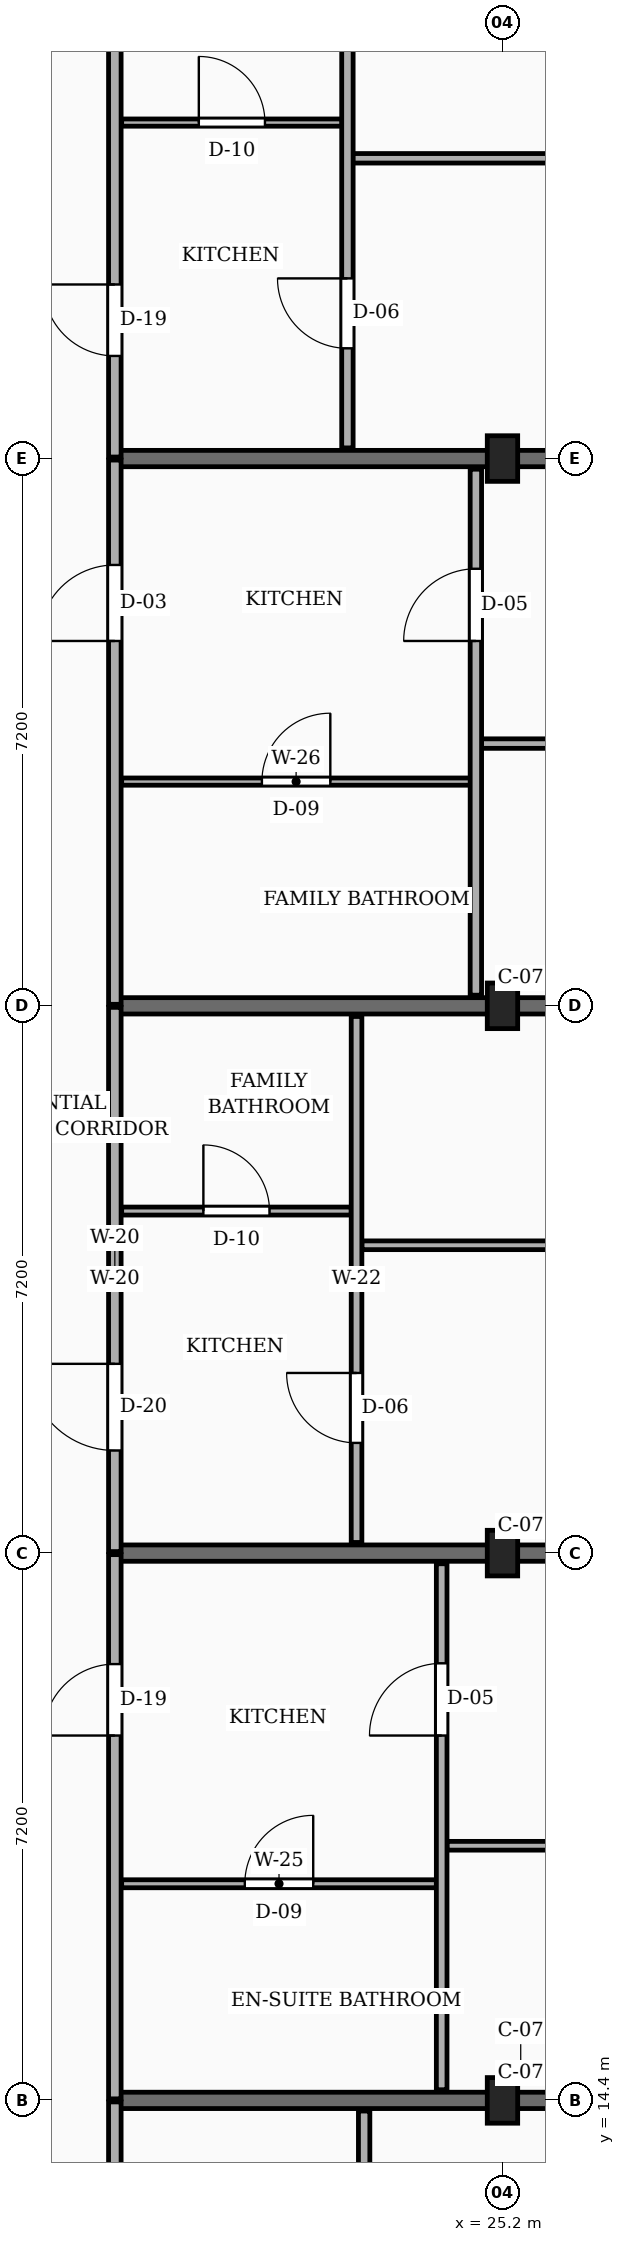
"""IFC4 building model, lengths in metres.
Left out: names, types, materials, properties, quantities, classifications, styles, units other than length and angle.
Written with IfcOpenShell. Run it as: python <this file> out.ifc"""

import sys

from ifc_helpers import new_model, si_unit, direction, frame, frame_2d, origin, origin_2d, place, context, subcontext, project, spatial, rectangle, extrude, element, fill, save


model = new_model("IFC4")
c1 = context("Model", 3, precision=1e-05, world=origin(), true_north=direction((0.0, 1.0)))
c2 = subcontext(c1, "Body", "Model", "MODEL_VIEW")
j1 = project(units=[si_unit("LENGTHUNIT", "METRE"), si_unit("PLANEANGLEUNIT", "RADIAN")], contexts=[c1])
p1 = place(None, origin())
s1 = spatial("IfcSite", under=j1, at=p1, CompositionType="ELEMENT")
p2 = place(p1, origin())
s2 = spatial("IfcBuilding", under=s1, at=p2, CompositionType="ELEMENT")
p3 = place(p2, frame((0.0, 0.0, 29.7)))
s3 = spatial("IfcBuildingStorey", under=s2, at=p3, CompositionType="ELEMENT", Elevation=29.7)
for number, where, z_axis, x_axis in (
    (1, (25.2, 14.4, 0.0), (0.0, 0.0, 1.0), (1.0, 0.0, 0.0)),
    (2, (25.2, 21.6, 0.0), (0.0, 0.0, 1.0), (1.0, 0.0, 0.0)),
    (3, (25.2, 28.8, 0.0), (0.0, 0.0, 1.0), (1.0, 0.0, 0.0)),
    (4, (25.2, 36.0, 0.0), (0.0, 0.0, 1.0), (1.0, 0.0, 0.0)),
):
    element("IfcColumn", number, at=place(p3, frame(where, z_axis=z_axis, x_axis=x_axis)), inside=s3, PredefinedType="COLUMN", context=c2, shape_type="SweptSolid", body=[
        extrude(rectangle(XDim=0.4, YDim=0.6, at=origin_2d()), origin(), (0.0, 0.0, 1.0), 3.15),
    ])
for number, where, z_axis, x_axis in (
    (5, (20.1, 14.4, 0.0), (0.0, 0.0, 1.0), (1.0, 0.0, 0.0)),
    (6, (20.1, 21.6, 0.0), (0.0, 0.0, 1.0), (1.0, 0.0, 0.0)),
    (7, (20.1, 28.8, 0.0), (0.0, 0.0, 1.0), (1.0, 0.0, 0.0)),
    (8, (20.1, 36.0, 0.0), (0.0, 0.0, 1.0), (1.0, 0.0, 0.0)),
):
    element("IfcWall", number, at=place(p3, frame(where, z_axis=z_axis, x_axis=x_axis)), inside=s3, PredefinedType="SOLIDWALL", context=c2, shape_type="SweptSolid", body=[
        extrude(rectangle(XDim=12.05, YDim=0.215, at=frame_2d((6.025, 0.0))), origin(), (0.0, 0.0, 1.0), 2.17),
    ])
p4 = place(p3, frame((20.1, 7.375, 0.0), z_axis=(0.0, 0.0, 1.0), x_axis=(0.0, 1.0, 0.0)))
e9 = element("IfcWall", 9, at=p4, inside=s3, PredefinedType="PARTITIONING", context=c2, shape_type="SweptSolid", body=[
    extrude(rectangle(XDim=7.005, YDim=0.165, at=frame_2d((3.502, 0.0))), origin(), (0.0, 0.0, 1.0), 2.305),
])
p5 = place(p4, frame((1.175, 0.0, 0.0)))
e10 = element("IfcOpeningElement", 10, at=p5, cuts=e9, PredefinedType="OPENING", context=c2, shape_type="SweptSolid", body=[
    extrude(rectangle(XDim=1.0, YDim=2.15, at=frame_2d((0.5, 1.075))), frame((0.0, 0.093, 0.0), z_axis=(0.0, -1.0, 0.0), x_axis=(1.0, 0.0, 0.0)), (0.0, 0.0, 1.0), 0.185),
])
p6 = place(p3, frame((20.1, 14.42, 0.0), z_axis=(0.0, 0.0, 1.0), x_axis=(0.0, 1.0, 0.0)))
e11 = element("IfcWall", 11, at=p6, inside=s3, PredefinedType="PARTITIONING", context=c2, shape_type="SweptSolid", body=[
    extrude(rectangle(XDim=7.16, YDim=0.165, at=frame_2d((3.58, 0.0))), origin(), (0.0, 0.0, 1.0), 2.305),
])
p7 = place(p6, frame((4.78, 0.0, 0.0)))
e12 = element("IfcOpeningElement", 12, at=p7, cuts=e11, PredefinedType="OPENING", context=c2, shape_type="SweptSolid", body=[
    extrude(rectangle(XDim=0.94, YDim=2.12, at=frame_2d((0.47, 1.06))), frame((0.0, 0.093, 0.0), z_axis=(0.0, -1.0, 0.0), x_axis=(1.0, 0.0, 0.0)), (0.0, 0.0, 1.0), 0.185),
])
p8 = place(p3, frame((20.1, 21.62, 0.0), z_axis=(0.0, 0.0, 1.0), x_axis=(0.0, 1.0, 0.0)))
e13 = element("IfcWall", 13, at=p8, inside=s3, PredefinedType="PARTITIONING", context=c2, shape_type="SweptSolid", body=[
    extrude(rectangle(XDim=7.16, YDim=0.165, at=frame_2d((3.58, 0.0))), origin(), (0.0, 0.0, 1.0), 2.305),
])
p9 = place(p8, frame((1.33, 0.0, 0.0)))
e14 = element("IfcOpeningElement", 14, at=p9, cuts=e13, PredefinedType="OPENING", context=c2, shape_type="SweptSolid", body=[
    extrude(rectangle(XDim=1.14, YDim=2.18, at=frame_2d((0.57, 1.09))), frame((0.0, 0.093, 0.0), z_axis=(0.0, -1.0, 0.0), x_axis=(1.0, 0.0, 0.0)), (0.0, 0.0, 1.0), 0.185),
])
p10 = place(p3, frame((20.1, 28.82, 0.0), z_axis=(0.0, 0.0, 1.0), x_axis=(0.0, 1.0, 0.0)))
e15 = element("IfcWall", 15, at=p10, inside=s3, PredefinedType="PARTITIONING", context=c2, shape_type="SweptSolid", body=[
    extrude(rectangle(XDim=7.16, YDim=0.165, at=frame_2d((3.58, 0.0))), origin(), (0.0, 0.0, 1.0), 2.305),
])
p11 = place(p10, frame((4.78, 0.0, 0.0)))
e16 = element("IfcOpeningElement", 16, at=p11, cuts=e15, PredefinedType="OPENING", context=c2, shape_type="SweptSolid", body=[
    extrude(rectangle(XDim=1.0, YDim=2.15, at=frame_2d((0.5, 1.075))), frame((0.0, 0.093, 0.0), z_axis=(0.0, -1.0, 0.0), x_axis=(1.0, 0.0, 0.0)), (0.0, 0.0, 1.0), 0.185),
])
p12 = place(p3, frame((20.1, 36.02, 0.0), z_axis=(0.0, 0.0, 1.0), x_axis=(0.0, 1.0, 0.0)))
e17 = element("IfcWall", 17, at=p12, inside=s3, PredefinedType="PARTITIONING", context=c2, shape_type="SweptSolid", body=[
    extrude(rectangle(XDim=7.005, YDim=0.165, at=frame_2d((3.502, 0.0))), origin(), (0.0, 0.0, 1.0), 2.305),
])
p13 = place(p12, frame((1.33, 0.0, 0.0)))
e18 = element("IfcOpeningElement", 18, at=p13, cuts=e17, PredefinedType="OPENING", context=c2, shape_type="SweptSolid", body=[
    extrude(rectangle(XDim=0.94, YDim=2.12, at=frame_2d((0.47, 1.06))), frame((0.0, 0.093, 0.0), z_axis=(0.0, -1.0, 0.0), x_axis=(1.0, 0.0, 0.0)), (0.0, 0.0, 1.0), 0.185),
])
p14 = place(p3, frame((23.38, 7.375, 0.0), z_axis=(0.0, 0.0, 1.0), x_axis=(0.0, 1.0, 0.0)))
e19 = element("IfcWall", 19, at=p14, inside=s3, PredefinedType="PARTITIONING", context=c2, shape_type="SweptSolid", body=[
    extrude(rectangle(XDim=6.885, YDim=0.15, at=frame_2d((3.442, 0.0))), origin(), (0.0, 0.0, 1.0), 2.305),
])
p15 = place(p14, frame((1.275, 0.0, 0.0)))
e20 = element("IfcOpeningElement", 20, at=p15, cuts=e19, PredefinedType="OPENING", context=c2, shape_type="SweptSolid", body=[
    extrude(rectangle(XDim=0.95, YDim=2.1, at=frame_2d((0.475, 1.05))), frame((0.0, 0.085, 0.0), z_axis=(0.0, -1.0, 0.0), x_axis=(1.0, 0.0, 0.0)), (0.0, 0.0, 1.0), 0.17),
])
p16 = place(p3, frame((24.47, 17.75, 0.0), z_axis=(0.0, 0.0, 1.0), x_axis=(1.0, 0.0, 0.0)))
e21 = element("IfcWall", 21, at=p16, inside=s3, PredefinedType="PARTITIONING", context=c2, shape_type="SweptSolid", body=[
    extrude(rectangle(XDim=7.755, YDim=0.115, at=frame_2d((3.877, 0.0))), origin(), (0.0, 0.0, 1.0), 2.305),
])
p17 = place(p16, frame((3.427, 0.0, 0.0)))
e22 = element("IfcOpeningElement", 22, at=p17, cuts=e21, PredefinedType="OPENING", context=c2, shape_type="SweptSolid", body=[
    extrude(rectangle(XDim=0.9, YDim=2.1, at=frame_2d((0.45, 1.05))), frame((0.0, 0.067, 0.0), z_axis=(0.0, -1.0, 0.0), x_axis=(1.0, 0.0, 0.0)), (0.0, 0.0, 1.0), 0.135),
])
p18 = place(p3, frame((20.19, 17.25, 0.0), z_axis=(0.0, 0.0, 1.0), x_axis=(1.0, 0.0, 0.0)))
e23 = element("IfcWall", 23, at=p18, inside=s3, PredefinedType="PARTITIONING", context=c2, shape_type="SweptSolid", body=[
    extrude(rectangle(XDim=4.14, YDim=0.105, at=frame_2d((2.07, 0.0))), origin(), (0.0, 0.0, 1.0), 2.305),
])
p19 = place(p18, frame((1.62, 0.0, 0.0)))
e24 = element("IfcOpeningElement", 24, at=p19, cuts=e23, PredefinedType="OPENING", context=c2, shape_type="SweptSolid", body=[
    extrude(rectangle(XDim=0.9, YDim=2.05, at=frame_2d((0.45, 1.025))), frame((0.0, 0.062, 0.0), z_axis=(0.0, -1.0, 0.0), x_axis=(1.0, 0.0, 0.0)), (0.0, 0.0, 1.0), 0.125),
])
p20 = place(p3, frame((24.4, 14.54, 0.0), z_axis=(0.0, 0.0, 1.0), x_axis=(0.0, 1.0, 0.0)))
e25 = element("IfcWall", 25, at=p20, inside=s3, PredefinedType="PARTITIONING", context=c2, shape_type="SweptSolid", body=[
    extrude(rectangle(XDim=6.92, YDim=0.14, at=frame_2d((3.46, 0.0))), origin(), (0.0, 0.0, 1.0), 2.305),
])
p21 = place(p20, frame((4.66, 0.0, 0.0)))
e26 = element("IfcOpeningElement", 26, at=p21, cuts=e25, PredefinedType="OPENING", context=c2, shape_type="SweptSolid", body=[
    extrude(rectangle(XDim=0.95, YDim=2.1, at=frame_2d((0.475, 1.05))), frame((0.0, 0.08, 0.0), z_axis=(0.0, -1.0, 0.0), x_axis=(1.0, 0.0, 0.0)), (0.0, 0.0, 1.0), 0.16),
])
p22 = place(p3, frame((23.35, 25.65, 0.0), z_axis=(0.0, 0.0, 1.0), x_axis=(1.0, 0.0, 0.0)))
e27 = element("IfcWall", 27, at=p22, inside=s3, PredefinedType="PARTITIONING", context=c2, shape_type="SweptSolid", body=[
    extrude(rectangle(XDim=8.875, YDim=0.115, at=frame_2d((4.438, 0.0))), origin(), (0.0, 0.0, 1.0), 2.305),
])
p23 = place(p22, frame((3.998, 0.0, 0.0)))
e28 = element("IfcOpeningElement", 28, at=p23, cuts=e27, PredefinedType="OPENING", context=c2, shape_type="SweptSolid", body=[
    extrude(rectangle(XDim=0.88, YDim=2.08, at=frame_2d((0.44, 1.04))), frame((0.0, 0.067, 0.0), z_axis=(0.0, -1.0, 0.0), x_axis=(1.0, 0.0, 0.0)), (0.0, 0.0, 1.0), 0.135),
])
p24 = place(p3, frame((20.19, 26.1, 0.0), z_axis=(0.0, 0.0, 1.0), x_axis=(1.0, 0.0, 0.0)))
e29 = element("IfcWall", 29, at=p24, inside=s3, PredefinedType="PARTITIONING", context=c2, shape_type="SweptSolid", body=[
    extrude(rectangle(XDim=3.02, YDim=0.105, at=frame_2d((1.51, 0.0))), origin(), (0.0, 0.0, 1.0), 2.305),
])
p25 = place(p24, frame((1.075, 0.0, 0.0)))
e30 = element("IfcOpeningElement", 30, at=p25, cuts=e29, PredefinedType="OPENING", context=c2, shape_type="SweptSolid", body=[
    extrude(rectangle(XDim=0.87, YDim=2.05, at=frame_2d((0.435, 1.025))), frame((0.0, 0.062, 0.0), z_axis=(0.0, -1.0, 0.0), x_axis=(1.0, 0.0, 0.0)), (0.0, 0.0, 1.0), 0.125),
])
p26 = place(p3, frame((23.28, 21.74, 0.0), z_axis=(0.0, 0.0, 1.0), x_axis=(0.0, 1.0, 0.0)))
e31 = element("IfcWall", 31, at=p26, inside=s3, PredefinedType="PARTITIONING", context=c2, shape_type="SweptSolid", body=[
    extrude(rectangle(XDim=6.92, YDim=0.14, at=frame_2d((3.46, 0.0))), origin(), (0.0, 0.0, 1.0), 2.305),
])
p27 = place(p26, frame((1.31, 0.0, 0.0)))
e32 = element("IfcOpeningElement", 32, at=p27, cuts=e31, PredefinedType="OPENING", context=c2, shape_type="SweptSolid", body=[
    extrude(rectangle(XDim=0.92, YDim=2.1, at=frame_2d((0.46, 1.05))), frame((0.0, 0.08, 0.0), z_axis=(0.0, -1.0, 0.0), x_axis=(1.0, 0.0, 0.0)), (0.0, 0.0, 1.0), 0.16),
])
p28 = place(p3, frame((24.92, 32.25, 0.0), z_axis=(0.0, 0.0, 1.0), x_axis=(1.0, 0.0, 0.0)))
e33 = element("IfcWall", 33, at=p28, inside=s3, PredefinedType="PARTITIONING", context=c2, shape_type="SweptSolid", body=[
    extrude(rectangle(XDim=7.305, YDim=0.125, at=frame_2d((3.653, 0.0))), origin(), (0.0, 0.0, 1.0), 2.305),
])
p29 = place(p28, frame((3.202, 0.0, 0.0)))
e34 = element("IfcOpeningElement", 34, at=p29, cuts=e33, PredefinedType="OPENING", context=c2, shape_type="SweptSolid", body=[
    extrude(rectangle(XDim=0.9, YDim=2.1, at=frame_2d((0.45, 1.05))), frame((0.0, 0.073, 0.0), z_axis=(0.0, -1.0, 0.0), x_axis=(1.0, 0.0, 0.0)), (0.0, 0.0, 1.0), 0.145),
])
p30 = place(p3, frame((20.19, 31.75, 0.0), z_axis=(0.0, 0.0, 1.0), x_axis=(1.0, 0.0, 0.0)))
e35 = element("IfcWall", 35, at=p30, inside=s3, PredefinedType="PARTITIONING", context=c2, shape_type="SweptSolid", body=[
    extrude(rectangle(XDim=4.59, YDim=0.095, at=frame_2d((2.295, 0.0))), origin(), (0.0, 0.0, 1.0), 2.305),
])
p31 = place(p30, frame((1.845, 0.0, 0.0)))
e36 = element("IfcOpeningElement", 36, at=p31, cuts=e35, PredefinedType="OPENING", context=c2, shape_type="SweptSolid", body=[
    extrude(rectangle(XDim=0.9, YDim=2.05, at=frame_2d((0.45, 1.025))), frame((0.0, 0.058, 0.0), z_axis=(0.0, -1.0, 0.0), x_axis=(1.0, 0.0, 0.0)), (0.0, 0.0, 1.0), 0.115),
])
p32 = place(p3, frame((24.85, 28.94, 0.0), z_axis=(0.0, 0.0, 1.0), x_axis=(0.0, 1.0, 0.0)))
e37 = element("IfcWall", 37, at=p32, inside=s3, PredefinedType="PARTITIONING", context=c2, shape_type="SweptSolid", body=[
    extrude(rectangle(XDim=6.92, YDim=0.15, at=frame_2d((3.46, 0.0))), origin(), (0.0, 0.0, 1.0), 2.305),
])
p33 = place(p32, frame((4.66, 0.0, 0.0)))
e38 = element("IfcOpeningElement", 38, at=p33, cuts=e37, PredefinedType="OPENING", context=c2, shape_type="SweptSolid", body=[
    extrude(rectangle(XDim=0.95, YDim=2.1, at=frame_2d((0.475, 1.05))), frame((0.0, 0.085, 0.0), z_axis=(0.0, -1.0, 0.0), x_axis=(1.0, 0.0, 0.0)), (0.0, 0.0, 1.0), 0.17),
])
p34 = place(p3, frame((23.23, 39.95, 0.0), z_axis=(0.0, 0.0, 1.0), x_axis=(1.0, 0.0, 0.0)))
e39 = element("IfcWall", 39, at=p34, inside=s3, PredefinedType="PARTITIONING", context=c2, shape_type="SweptSolid", body=[
    extrude(rectangle(XDim=8.995, YDim=0.125, at=frame_2d((4.498, 0.0))), origin(), (0.0, 0.0, 1.0), 2.305),
])
p35 = place(p34, frame((4.058, 0.0, 0.0)))
e40 = element("IfcOpeningElement", 40, at=p35, cuts=e39, PredefinedType="OPENING", context=c2, shape_type="SweptSolid", body=[
    extrude(rectangle(XDim=0.88, YDim=2.08, at=frame_2d((0.44, 1.04))), frame((0.0, 0.073, 0.0), z_axis=(0.0, -1.0, 0.0), x_axis=(1.0, 0.0, 0.0)), (0.0, 0.0, 1.0), 0.145),
])
p36 = place(p3, frame((20.19, 40.42, 0.0), z_axis=(0.0, 0.0, 1.0), x_axis=(1.0, 0.0, 0.0)))
e41 = element("IfcWall", 41, at=p36, inside=s3, PredefinedType="PARTITIONING", context=c2, shape_type="SweptSolid", body=[
    extrude(rectangle(XDim=2.9, YDim=0.095, at=frame_2d((1.45, 0.0))), origin(), (0.0, 0.0, 1.0), 2.305),
])
p37 = place(p36, frame((1.015, 0.0, 0.0)))
e42 = element("IfcOpeningElement", 42, at=p37, cuts=e41, PredefinedType="OPENING", context=c2, shape_type="SweptSolid", body=[
    extrude(rectangle(XDim=0.87, YDim=2.05, at=frame_2d((0.435, 1.025))), frame((0.0, 0.058, 0.0), z_axis=(0.0, -1.0, 0.0), x_axis=(1.0, 0.0, 0.0)), (0.0, 0.0, 1.0), 0.115),
])
p38 = place(p3, frame((23.16, 36.14, 0.0), z_axis=(0.0, 0.0, 1.0), x_axis=(0.0, 1.0, 0.0)))
e43 = element("IfcWall", 43, at=p38, inside=s3, PredefinedType="PARTITIONING", context=c2, shape_type="SweptSolid", body=[
    extrude(rectangle(XDim=6.885, YDim=0.15, at=frame_2d((3.442, 0.0))), origin(), (0.0, 0.0, 1.0), 2.305),
])
p39 = place(p38, frame((1.31, 0.0, 0.0)))
e44 = element("IfcOpeningElement", 44, at=p39, cuts=e43, PredefinedType="OPENING", context=c2, shape_type="SweptSolid", body=[
    extrude(rectangle(XDim=0.92, YDim=2.1, at=frame_2d((0.46, 1.05))), frame((0.0, 0.085, 0.0), z_axis=(0.0, -1.0, 0.0), x_axis=(1.0, 0.0, 0.0)), (0.0, 0.0, 1.0), 0.17),
])
p40 = place(p7, origin())
e45 = element("IfcDoor", 45, at=p40, inside=s3, OperationType="SINGLE_SWING_LEFT", PredefinedType="DOOR", context=c2, shape_type="SweptSolid", body=[
    extrude(rectangle(XDim=0.94, YDim=2.12, at=frame_2d((0.47, 1.06))), frame((0.0, 0.025, 0.0), z_axis=(0.0, -1.0, 0.0), x_axis=(1.0, 0.0, 0.0)), (0.0, 0.0, 1.0), 0.05),
])
fill(e12, e45)
p41 = place(p9, origin())
e46 = element("IfcDoor", 46, at=p41, inside=s3, OperationType="SINGLE_SWING_RIGHT", PredefinedType="DOOR", context=c2, shape_type="SweptSolid", body=[
    extrude(rectangle(XDim=1.14, YDim=2.18, at=frame_2d((0.57, 1.09))), frame((0.0, 0.025, 0.0), z_axis=(0.0, -1.0, 0.0), x_axis=(1.0, 0.0, 0.0)), (0.0, 0.0, 1.0), 0.05),
])
fill(e14, e46)
p42 = place(p11, origin())
e47 = element("IfcDoor", 47, at=p42, inside=s3, OperationType="SINGLE_SWING_LEFT", PredefinedType="DOOR", context=c2, shape_type="SweptSolid", body=[
    extrude(rectangle(XDim=1.0, YDim=2.15, at=frame_2d((0.5, 1.075))), frame((0.0, 0.025, 0.0), z_axis=(0.0, -1.0, 0.0), x_axis=(1.0, 0.0, 0.0)), (0.0, 0.0, 1.0), 0.05),
])
fill(e16, e47)
p43 = place(p13, origin())
e48 = element("IfcDoor", 48, at=p43, inside=s3, OperationType="SINGLE_SWING_RIGHT", PredefinedType="DOOR", context=c2, shape_type="SweptSolid", body=[
    extrude(rectangle(XDim=0.94, YDim=2.12, at=frame_2d((0.47, 1.06))), frame((0.0, 0.025, 0.0), z_axis=(0.0, -1.0, 0.0), x_axis=(1.0, 0.0, 0.0)), (0.0, 0.0, 1.0), 0.05),
])
fill(e18, e48)
p44 = place(p19, origin())
e49 = element("IfcDoor", 49, at=p44, inside=s3, OperationType="SINGLE_SWING_RIGHT", PredefinedType="DOOR", context=c2, shape_type="SweptSolid", body=[
    extrude(rectangle(XDim=0.9, YDim=2.05, at=frame_2d((0.45, 1.025))), frame((0.0, 0.025, 0.0), z_axis=(0.0, -1.0, 0.0), x_axis=(1.0, 0.0, 0.0)), (0.0, 0.0, 1.0), 0.05),
])
fill(e24, e49)
p45 = place(p21, origin())
e50 = element("IfcDoor", 50, at=p45, inside=s3, OperationType="SINGLE_SWING_LEFT", PredefinedType="DOOR", context=c2, shape_type="SweptSolid", body=[
    extrude(rectangle(XDim=0.95, YDim=2.1, at=frame_2d((0.475, 1.05))), frame((0.0, 0.025, 0.0), z_axis=(0.0, -1.0, 0.0), x_axis=(1.0, 0.0, 0.0)), (0.0, 0.0, 1.0), 0.05),
])
fill(e26, e50)
p46 = place(p25, origin())
e51 = element("IfcDoor", 51, at=p46, inside=s3, OperationType="SINGLE_SWING_LEFT", PredefinedType="DOOR", context=c2, shape_type="SweptSolid", body=[
    extrude(rectangle(XDim=0.87, YDim=2.05, at=frame_2d((0.435, 1.025))), frame((0.0, 0.025, 0.0), z_axis=(0.0, -1.0, 0.0), x_axis=(1.0, 0.0, 0.0)), (0.0, 0.0, 1.0), 0.05),
])
fill(e30, e51)
p47 = place(p27, origin())
e52 = element("IfcDoor", 52, at=p47, inside=s3, OperationType="SINGLE_SWING_RIGHT", PredefinedType="DOOR", context=c2, shape_type="SweptSolid", body=[
    extrude(rectangle(XDim=0.92, YDim=2.1, at=frame_2d((0.46, 1.05))), frame((0.0, 0.025, 0.0), z_axis=(0.0, -1.0, 0.0), x_axis=(1.0, 0.0, 0.0)), (0.0, 0.0, 1.0), 0.05),
])
fill(e32, e52)
p48 = place(p31, origin())
e53 = element("IfcDoor", 53, at=p48, inside=s3, OperationType="SINGLE_SWING_RIGHT", PredefinedType="DOOR", context=c2, shape_type="SweptSolid", body=[
    extrude(rectangle(XDim=0.9, YDim=2.05, at=frame_2d((0.45, 1.025))), frame((0.0, 0.025, 0.0), z_axis=(0.0, -1.0, 0.0), x_axis=(1.0, 0.0, 0.0)), (0.0, 0.0, 1.0), 0.05),
])
fill(e36, e53)
p49 = place(p33, origin())
e54 = element("IfcDoor", 54, at=p49, inside=s3, OperationType="SINGLE_SWING_LEFT", PredefinedType="DOOR", context=c2, shape_type="SweptSolid", body=[
    extrude(rectangle(XDim=0.95, YDim=2.1, at=frame_2d((0.475, 1.05))), frame((0.0, 0.025, 0.0), z_axis=(0.0, -1.0, 0.0), x_axis=(1.0, 0.0, 0.0)), (0.0, 0.0, 1.0), 0.05),
])
fill(e38, e54)
p50 = place(p37, origin())
e55 = element("IfcDoor", 55, at=p50, inside=s3, OperationType="SINGLE_SWING_LEFT", PredefinedType="DOOR", context=c2, shape_type="SweptSolid", body=[
    extrude(rectangle(XDim=0.87, YDim=2.05, at=frame_2d((0.435, 1.025))), frame((0.0, 0.025, 0.0), z_axis=(0.0, -1.0, 0.0), x_axis=(1.0, 0.0, 0.0)), (0.0, 0.0, 1.0), 0.05),
])
fill(e42, e55)
p51 = place(p39, origin())
e56 = element("IfcDoor", 56, at=p51, inside=s3, OperationType="SINGLE_SWING_RIGHT", PredefinedType="DOOR", context=c2, shape_type="SweptSolid", body=[
    extrude(rectangle(XDim=0.92, YDim=2.1, at=frame_2d((0.46, 1.05))), frame((0.0, 0.025, 0.0), z_axis=(0.0, -1.0, 0.0), x_axis=(1.0, 0.0, 0.0)), (0.0, 0.0, 1.0), 0.05),
])
fill(e44, e56)
save(model, sys.argv[1])
